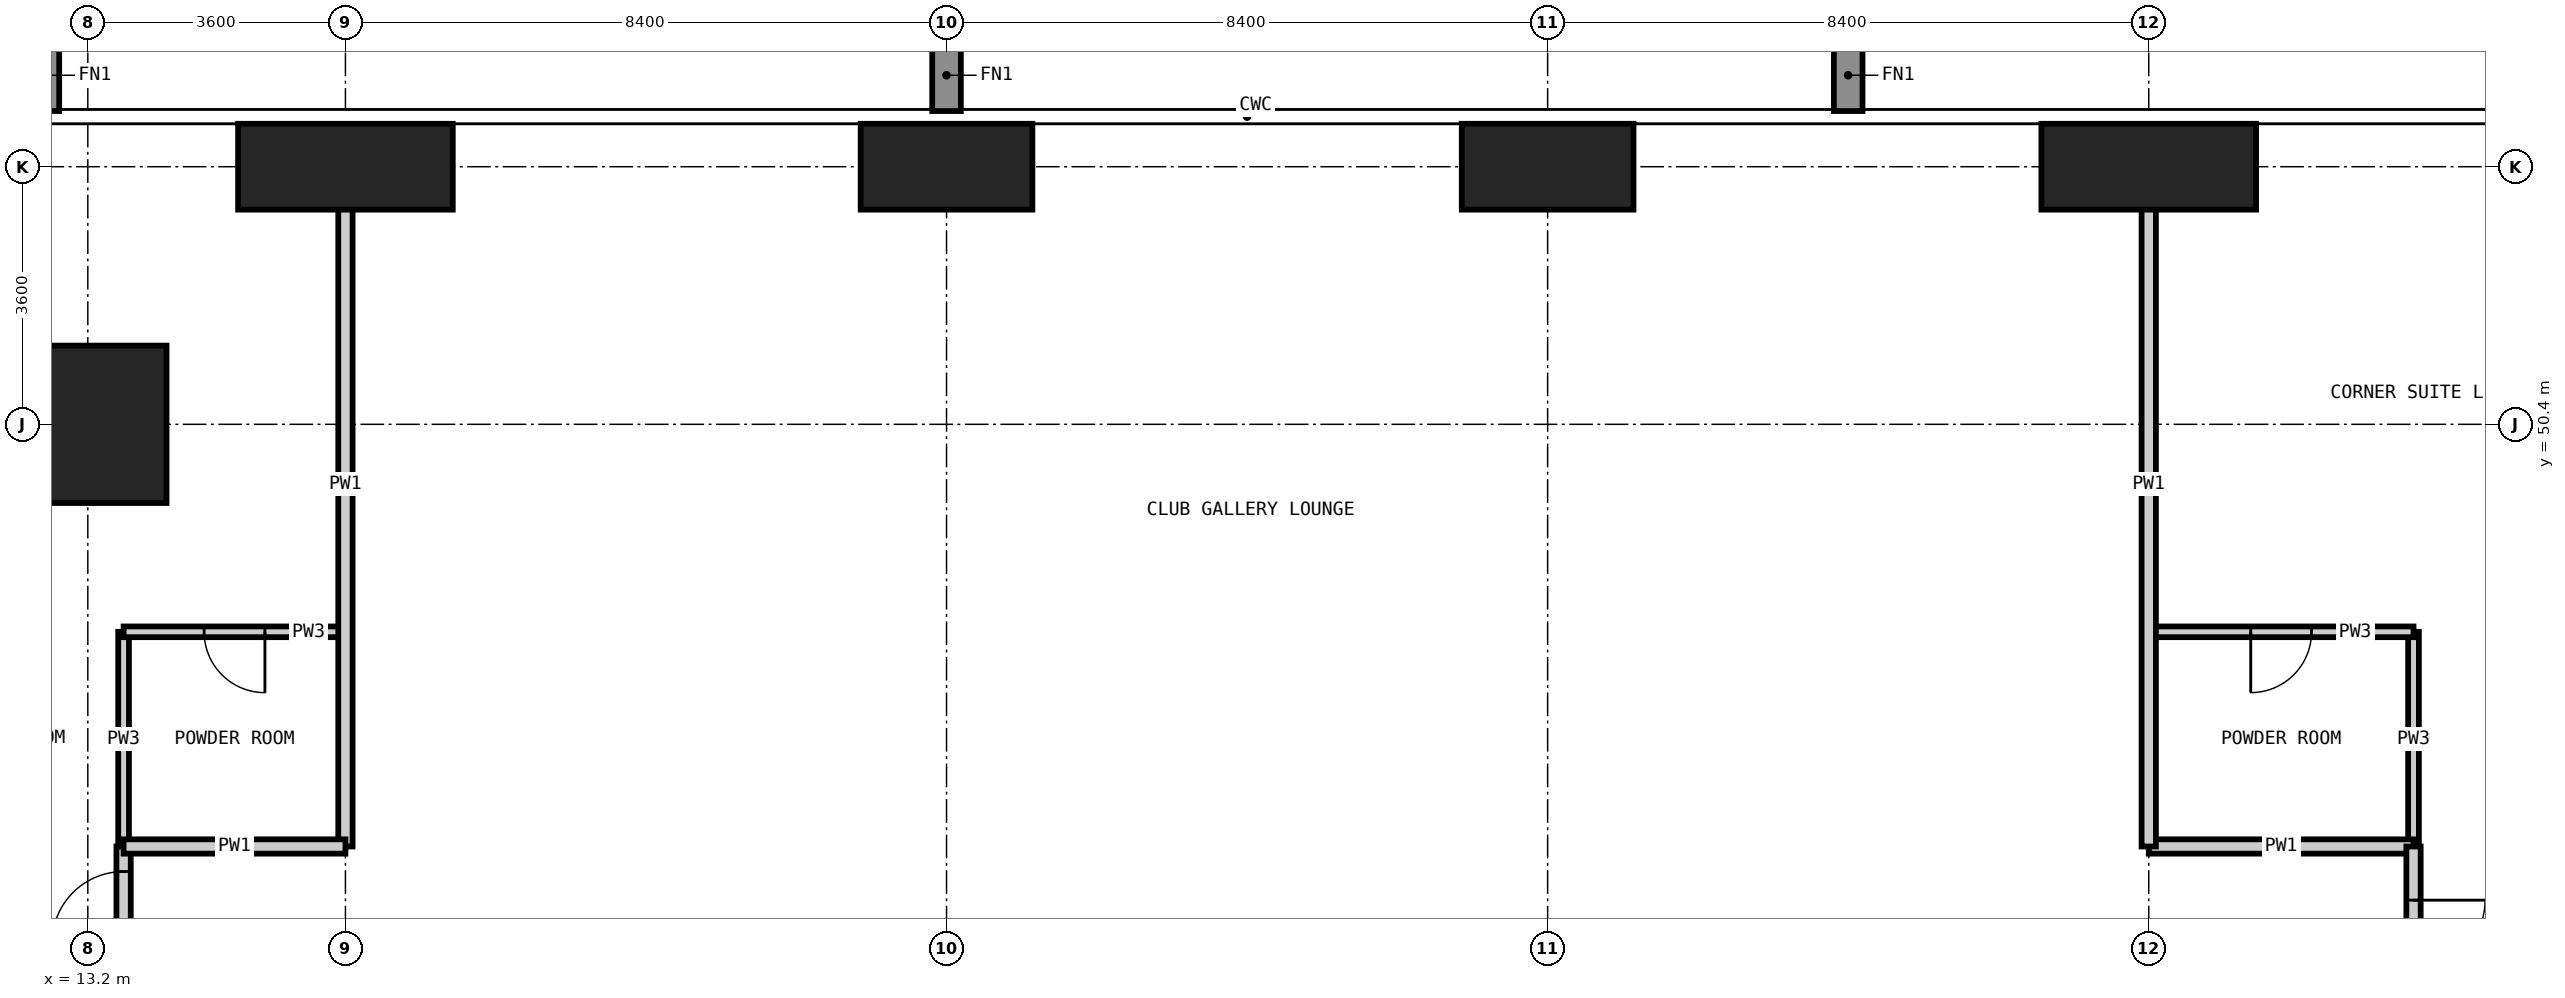
"""IFC4 building model, lengths in metres.
Left out: names, types, materials, properties, quantities, classifications, styles, units other than length and angle.
Written with IfcOpenShell. Run it as: python <this file> out.ifc"""

import sys

from ifc_helpers import new_model, si_unit, direction, frame, frame_2d, origin, origin_2d, place, context, subcontext, project, spatial, rectangle, extrude, element, fill, save


model = new_model("IFC4")
c1 = context("Model", 3, precision=1e-05, world=origin(), true_north=direction((0.0, 1.0)))
c2 = subcontext(c1, "Body", "Model", "MODEL_VIEW")
j1 = project(units=[si_unit("LENGTHUNIT", "METRE"), si_unit("PLANEANGLEUNIT", "RADIAN")], contexts=[c1])
p1 = place(None, origin())
s1 = spatial("IfcSite", under=j1, at=p1, CompositionType="ELEMENT")
p2 = place(p1, origin())
s2 = spatial("IfcBuilding", under=s1, at=p2, CompositionType="ELEMENT")
p3 = place(p2, frame((0.0, 0.0, 162.6)))
s3 = spatial("IfcBuildingStorey", under=s2, at=p3, CompositionType="ELEMENT", Elevation=162.6)
p4 = place(p3, frame((13.2, 50.4, -0.35), z_axis=(0.0, 0.0, 1.0), x_axis=(1.0, 0.0, 0.0)))
e1 = element("IfcColumn", 1, at=p4, inside=s3, PredefinedType="COLUMN", context=c2, shape_type="SweptSolid", body=[
    extrude(rectangle(XDim=2.2, YDim=2.2, at=origin_2d()), origin(), (0.0, 0.0, 1.0), 3.6),
])
p5 = place(p3, frame((16.8, 54.0, -0.35), z_axis=(0.0, 0.0, 1.0), x_axis=(1.0, 0.0, 0.0)))
e2 = element("IfcColumn", 2, at=p5, inside=s3, PredefinedType="COLUMN", context=c2, shape_type="SweptSolid", body=[
    extrude(rectangle(XDim=3.0, YDim=1.2, at=origin_2d()), origin(), (0.0, 0.0, 1.0), 3.6),
])
for number, where, z_axis, x_axis in (
    (3, (25.2, 54.0, -0.35), (0.0, 0.0, 1.0), (1.0, 0.0, 0.0)),
    (4, (33.6, 54.0, -0.35), (0.0, 0.0, 1.0), (1.0, 0.0, 0.0)),
):
    element("IfcColumn", number, at=place(p3, frame(where, z_axis=z_axis, x_axis=x_axis)), inside=s3, PredefinedType="COLUMN", context=c2, shape_type="SweptSolid", body=[
        extrude(rectangle(XDim=2.4, YDim=1.2, at=origin_2d()), origin(), (0.0, 0.0, 1.0), 3.6),
    ])
p6 = place(p3, frame((42.0, 54.0, -0.35), z_axis=(0.0, 0.0, 1.0), x_axis=(1.0, 0.0, 0.0)))
e5 = element("IfcColumn", 5, at=p6, inside=s3, PredefinedType="COLUMN", context=c2, shape_type="SweptSolid", body=[
    extrude(rectangle(XDim=3.0, YDim=1.2, at=origin_2d()), origin(), (0.0, 0.0, 1.0), 3.6),
])
for number, where, z_axis, x_axis in (
    (6, (13.7, 44.5, 0.0), (0.0, 0.0, 1.0), (0.0, 1.0, 0.0)),
    (7, (45.7, 44.5, 0.0), (0.0, 0.0, 1.0), (0.0, 1.0, 0.0)),
):
    element("IfcWall", number, at=place(p3, frame(where, z_axis=z_axis, x_axis=x_axis)), inside=s3, PredefinedType="PARTITIONING", context=c2, shape_type="SweptSolid", body=[
        extrude(rectangle(XDim=3.0, YDim=0.15, at=frame_2d((1.5, 0.0))), origin(), (0.0, 0.0, 1.0), 3.25),
    ])
p7 = place(p3, frame((13.7, 47.5, 0.0), z_axis=(0.0, 0.0, 1.0), x_axis=(1.0, 0.0, 0.0)))
e8 = element("IfcWall", 8, at=p7, inside=s3, PredefinedType="PARTITIONING", context=c2, shape_type="SweptSolid", body=[
    extrude(rectangle(XDim=3.1, YDim=0.15, at=frame_2d((1.55, 0.0))), origin(), (0.0, 0.0, 1.0), 3.25),
])
p8 = place(p7, frame((1.125, 0.0, 0.0)))
e9 = element("IfcOpeningElement", 9, at=p8, cuts=e8, PredefinedType="OPENING", context=c2, shape_type="SweptSolid", body=[
    extrude(rectangle(XDim=0.85, YDim=2.1, at=frame_2d((0.425, 1.05))), frame((0.0, 0.085, 0.0), z_axis=(0.0, -1.0, 0.0), x_axis=(1.0, 0.0, 0.0)), (0.0, 0.0, 1.0), 0.17),
])
p9 = place(p3, frame((42.0, 47.5, 0.0), z_axis=(0.0, 0.0, 1.0), x_axis=(1.0, 0.0, 0.0)))
e10 = element("IfcWall", 10, at=p9, inside=s3, PredefinedType="PARTITIONING", context=c2, shape_type="SweptSolid", body=[
    extrude(rectangle(XDim=3.7, YDim=0.15, at=frame_2d((1.85, 0.0))), origin(), (0.0, 0.0, 1.0), 3.25),
])
p10 = place(p9, frame((1.425, 0.0, 0.0)))
e11 = element("IfcOpeningElement", 11, at=p10, cuts=e10, PredefinedType="OPENING", context=c2, shape_type="SweptSolid", body=[
    extrude(rectangle(XDim=0.85, YDim=2.1, at=frame_2d((0.425, 1.05))), frame((0.0, 0.085, 0.0), z_axis=(0.0, -1.0, 0.0), x_axis=(1.0, 0.0, 0.0)), (0.0, 0.0, 1.0), 0.17),
])
p11 = place(p3, frame((13.7, 13.7, 0.0), z_axis=(0.0, 0.0, 1.0), x_axis=(0.0, 1.0, 0.0)))
e12 = element("IfcWall", 12, at=p11, inside=s3, PredefinedType="PARTITIONING", context=c2, shape_type="SweptSolid", body=[
    extrude(rectangle(XDim=30.8, YDim=0.2, at=frame_2d((15.4, 0.0))), origin(), (0.0, 0.0, 1.0), 3.25),
])
p12 = place(p11, frame((4.7, 0.0, 0.0)))
e13 = element("IfcOpeningElement", 13, at=p12, cuts=e12, PredefinedType="OPENING", context=c2, shape_type="SweptSolid", body=[
    extrude(rectangle(XDim=1.0, YDim=2.2, at=frame_2d((0.5, 1.1))), frame((0.0, 0.11, 0.0), z_axis=(0.0, -1.0, 0.0), x_axis=(1.0, 0.0, 0.0)), (0.0, 0.0, 1.0), 0.22),
])
p13 = place(p11, frame((8.9, 0.0, 0.0)))
e14 = element("IfcOpeningElement", 14, at=p13, cuts=e12, PredefinedType="OPENING", context=c2, shape_type="SweptSolid", body=[
    extrude(rectangle(XDim=1.0, YDim=2.2, at=frame_2d((0.5, 1.1))), frame((0.0, 0.11, 0.0), z_axis=(0.0, -1.0, 0.0), x_axis=(1.0, 0.0, 0.0)), (0.0, 0.0, 1.0), 0.22),
])
p14 = place(p11, frame((13.1, 0.0, 0.0)))
e15 = element("IfcOpeningElement", 15, at=p14, cuts=e12, PredefinedType="OPENING", context=c2, shape_type="SweptSolid", body=[
    extrude(rectangle(XDim=1.0, YDim=2.2, at=frame_2d((0.5, 1.1))), frame((0.0, 0.11, 0.0), z_axis=(0.0, -1.0, 0.0), x_axis=(1.0, 0.0, 0.0)), (0.0, 0.0, 1.0), 0.22),
])
p15 = place(p11, frame((17.3, 0.0, 0.0)))
e16 = element("IfcOpeningElement", 16, at=p15, cuts=e12, PredefinedType="OPENING", context=c2, shape_type="SweptSolid", body=[
    extrude(rectangle(XDim=1.0, YDim=2.2, at=frame_2d((0.5, 1.1))), frame((0.0, 0.11, 0.0), z_axis=(0.0, -1.0, 0.0), x_axis=(1.0, 0.0, 0.0)), (0.0, 0.0, 1.0), 0.22),
])
p16 = place(p11, frame((21.5, 0.0, 0.0)))
e17 = element("IfcOpeningElement", 17, at=p16, cuts=e12, PredefinedType="OPENING", context=c2, shape_type="SweptSolid", body=[
    extrude(rectangle(XDim=1.0, YDim=2.2, at=frame_2d((0.5, 1.1))), frame((0.0, 0.11, 0.0), z_axis=(0.0, -1.0, 0.0), x_axis=(1.0, 0.0, 0.0)), (0.0, 0.0, 1.0), 0.22),
])
p17 = place(p11, frame((25.7, 0.0, 0.0)))
e18 = element("IfcOpeningElement", 18, at=p17, cuts=e12, PredefinedType="OPENING", context=c2, shape_type="SweptSolid", body=[
    extrude(rectangle(XDim=1.0, YDim=2.2, at=frame_2d((0.5, 1.1))), frame((0.0, 0.11, 0.0), z_axis=(0.0, -1.0, 0.0), x_axis=(1.0, 0.0, 0.0)), (0.0, 0.0, 1.0), 0.22),
])
p18 = place(p11, frame((0.95, 0.0, 0.0)))
e19 = element("IfcOpeningElement", 19, at=p18, cuts=e12, PredefinedType="OPENING", context=c2, shape_type="SweptSolid", body=[
    extrude(rectangle(XDim=1.0, YDim=2.2, at=frame_2d((0.5, 1.1))), frame((0.0, 0.11, 0.0), z_axis=(0.0, -1.0, 0.0), x_axis=(1.0, 0.0, 0.0)), (0.0, 0.0, 1.0), 0.22),
])
p19 = place(p11, frame((29.45, 0.0, 0.0)))
e20 = element("IfcOpeningElement", 20, at=p19, cuts=e12, PredefinedType="OPENING", context=c2, shape_type="SweptSolid", body=[
    extrude(rectangle(XDim=1.0, YDim=2.2, at=frame_2d((0.5, 1.1))), frame((0.0, 0.11, 0.0), z_axis=(0.0, -1.0, 0.0), x_axis=(1.0, 0.0, 0.0)), (0.0, 0.0, 1.0), 0.22),
])
p20 = place(p3, frame((16.8, 44.5, 0.0), z_axis=(0.0, 0.0, 1.0), x_axis=(0.0, 1.0, 0.0)))
e21 = element("IfcWall", 21, at=p20, inside=s3, PredefinedType="PARTITIONING", context=c2, shape_type="SweptSolid", body=[
    extrude(rectangle(XDim=10.118, YDim=0.2, at=frame_2d((5.059, 0.0))), origin(), (0.0, 0.0, 1.0), 3.25),
])
p21 = place(p3, frame((13.7, 44.5, 0.0), z_axis=(0.0, 0.0, 1.0), x_axis=(1.0, 0.0, 0.0)))
e22 = element("IfcWall", 22, at=p21, inside=s3, PredefinedType="PARTITIONING", context=c2, shape_type="SweptSolid", body=[
    extrude(rectangle(XDim=3.1, YDim=0.2, at=frame_2d((1.55, 0.0))), origin(), (0.0, 0.0, 1.0), 3.25),
])
p22 = place(p3, frame((42.0, 44.5, 0.0), z_axis=(0.0, 0.0, 1.0), x_axis=(1.0, 0.0, 0.0)))
e23 = element("IfcWall", 23, at=p22, inside=s3, PredefinedType="PARTITIONING", context=c2, shape_type="SweptSolid", body=[
    extrude(rectangle(XDim=3.7, YDim=0.2, at=frame_2d((1.85, 0.0))), origin(), (0.0, 0.0, 1.0), 3.25),
])
p23 = place(p3, frame((42.0, 54.618, 0.0), z_axis=(0.0, 0.0, 1.0), x_axis=(0.0, -1.0, 0.0)))
e24 = element("IfcWall", 24, at=p23, inside=s3, PredefinedType="PARTITIONING", context=c2, shape_type="SweptSolid", body=[
    extrude(rectangle(XDim=10.118, YDim=0.2, at=frame_2d((5.059, 0.0))), origin(), (0.0, 0.0, 1.0), 3.25),
])
p24 = place(p3, frame((45.7, 44.5, 0.0), z_axis=(0.0, 0.0, 1.0), x_axis=(0.0, -1.0, 0.0)))
e25 = element("IfcWall", 25, at=p24, inside=s3, PredefinedType="PARTITIONING", context=c2, shape_type="SweptSolid", body=[
    extrude(rectangle(XDim=30.8, YDim=0.2, at=frame_2d((15.4, 0.0))), origin(), (0.0, 0.0, 1.0), 3.25),
])
p25 = place(p24, frame((23.0, 0.0, 0.0)))
e26 = element("IfcOpeningElement", 26, at=p25, cuts=e25, PredefinedType="OPENING", context=c2, shape_type="SweptSolid", body=[
    extrude(rectangle(XDim=1.0, YDim=2.2, at=frame_2d((0.5, 1.1))), frame((0.0, 0.11, 0.0), z_axis=(0.0, -1.0, 0.0), x_axis=(1.0, 0.0, 0.0)), (0.0, 0.0, 1.0), 0.22),
])
p26 = place(p24, frame((14.6, 0.0, 0.0)))
e27 = element("IfcOpeningElement", 27, at=p26, cuts=e25, PredefinedType="OPENING", context=c2, shape_type="SweptSolid", body=[
    extrude(rectangle(XDim=1.0, YDim=2.2, at=frame_2d((0.5, 1.1))), frame((0.0, 0.11, 0.0), z_axis=(0.0, -1.0, 0.0), x_axis=(1.0, 0.0, 0.0)), (0.0, 0.0, 1.0), 0.22),
])
p27 = place(p24, frame((6.2, 0.0, 0.0)))
e28 = element("IfcOpeningElement", 28, at=p27, cuts=e25, PredefinedType="OPENING", context=c2, shape_type="SweptSolid", body=[
    extrude(rectangle(XDim=1.0, YDim=2.2, at=frame_2d((0.5, 1.1))), frame((0.0, 0.11, 0.0), z_axis=(0.0, -1.0, 0.0), x_axis=(1.0, 0.0, 0.0)), (0.0, 0.0, 1.0), 0.22),
])
p28 = place(p24, frame((28.75, 0.0, 0.0)))
e29 = element("IfcOpeningElement", 29, at=p28, cuts=e25, PredefinedType="OPENING", context=c2, shape_type="SweptSolid", body=[
    extrude(rectangle(XDim=1.0, YDim=2.2, at=frame_2d((0.5, 1.1))), frame((0.0, 0.11, 0.0), z_axis=(0.0, -1.0, 0.0), x_axis=(1.0, 0.0, 0.0)), (0.0, 0.0, 1.0), 0.22),
])
p29 = place(p24, frame((0.75, 0.0, 0.0)))
e30 = element("IfcOpeningElement", 30, at=p29, cuts=e25, PredefinedType="OPENING", context=c2, shape_type="SweptSolid", body=[
    extrude(rectangle(XDim=1.0, YDim=2.2, at=frame_2d((0.5, 1.1))), frame((0.0, 0.11, 0.0), z_axis=(0.0, -1.0, 0.0), x_axis=(1.0, 0.0, 0.0)), (0.0, 0.0, 1.0), 0.22),
])
p30 = place(p29, origin())
e31 = element("IfcDoor", 31, at=p30, inside=s3, OperationType="SINGLE_SWING_LEFT", PredefinedType="DOOR", context=c2, shape_type="SweptSolid", body=[
    extrude(rectangle(XDim=1.0, YDim=2.2, at=frame_2d((0.5, 1.1))), frame((0.0, 0.025, 0.0), z_axis=(0.0, -1.0, 0.0), x_axis=(1.0, 0.0, 0.0)), (0.0, 0.0, 1.0), 0.05),
])
fill(e30, e31)
p31 = place(p10, frame((0.85, 0.0, 0.0), z_axis=(0.0, 0.0, 1.0), x_axis=(-1.0, 0.0, 0.0)))
e32 = element("IfcDoor", 32, at=p31, inside=s3, OperationType="SINGLE_SWING_RIGHT", PredefinedType="DOOR", context=c2, shape_type="SweptSolid", body=[
    extrude(rectangle(XDim=0.85, YDim=2.1, at=frame_2d((0.425, 1.05))), frame((0.0, 0.025, 0.0), z_axis=(0.0, -1.0, 0.0), x_axis=(1.0, 0.0, 0.0)), (0.0, 0.0, 1.0), 0.05),
])
fill(e11, e32)
p32 = place(p19, origin())
e33 = element("IfcDoor", 33, at=p32, inside=s3, OperationType="SINGLE_SWING_LEFT", PredefinedType="DOOR", context=c2, shape_type="SweptSolid", body=[
    extrude(rectangle(XDim=1.0, YDim=2.2, at=frame_2d((0.5, 1.1))), frame((0.0, 0.025, 0.0), z_axis=(0.0, -1.0, 0.0), x_axis=(1.0, 0.0, 0.0)), (0.0, 0.0, 1.0), 0.05),
])
fill(e20, e33)
p33 = place(p8, frame((0.85, 0.0, 0.0), z_axis=(0.0, 0.0, 1.0), x_axis=(-1.0, 0.0, 0.0)))
e34 = element("IfcDoor", 34, at=p33, inside=s3, OperationType="SINGLE_SWING_LEFT", PredefinedType="DOOR", context=c2, shape_type="SweptSolid", body=[
    extrude(rectangle(XDim=0.85, YDim=2.1, at=frame_2d((0.425, 1.05))), frame((0.0, 0.025, 0.0), z_axis=(0.0, -1.0, 0.0), x_axis=(1.0, 0.0, 0.0)), (0.0, 0.0, 1.0), 0.05),
])
fill(e9, e34)
save(model, sys.argv[1])
